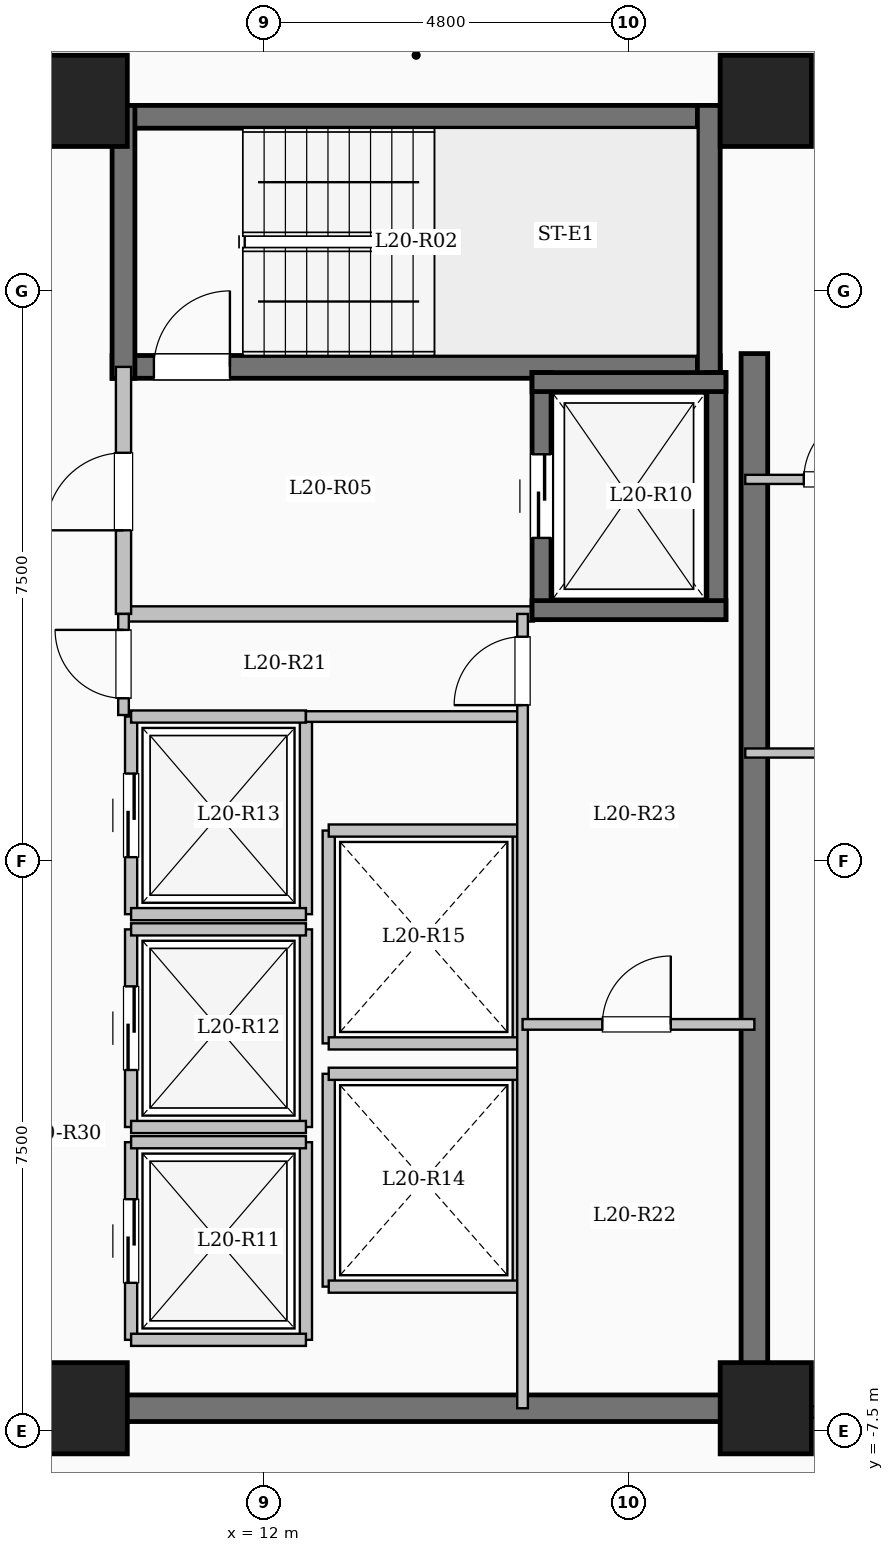
"""IFC4 building model, lengths in metres.
Left out: names, types, materials, properties, quantities, classifications, styles, units other than length and angle.
Written with IfcOpenShell. Run it as: python <this file> out.ifc"""

import sys

from ifc_helpers import new_model, si_unit, direction, frame, frame_2d, origin, origin_2d, place, context, subcontext, project, spatial, rectangle, extrude, element, fill, save


model = new_model("IFC4")
c1 = context("Model", 3, precision=1e-05, world=origin(), true_north=direction((0.0, 1.0)))
c2 = subcontext(c1, "Body", "Model", "MODEL_VIEW")
j1 = project(units=[si_unit("LENGTHUNIT", "METRE"), si_unit("PLANEANGLEUNIT", "RADIAN")], contexts=[c1])
p1 = place(None, origin())
s1 = spatial("IfcSite", under=j1, at=p1, CompositionType="ELEMENT")
p2 = place(p1, origin())
s2 = spatial("IfcBuilding", under=s1, at=p2, CompositionType="ELEMENT")
p3 = place(p2, frame((0.0, 0.0, 78.3)))
s3 = spatial("IfcBuildingStorey", under=s2, at=p3, CompositionType="ELEMENT", Elevation=78.3)
for number, where, z_axis, x_axis in (
    (1, (9.6, -7.2, 0.0), (0.0, 0.0, 1.0), (1.0, 0.0, 0.0)),
    (2, (9.6, 10.0, 0.0), (0.0, 0.0, 1.0), (1.0, 0.0, 0.0)),
    (3, (18.6, -7.2, 0.0), (0.0, 0.0, 1.0), (1.0, 0.0, 0.0)),
    (4, (18.6, 10.0, 0.0), (0.0, 0.0, 1.0), (1.0, 0.0, 0.0)),
):
    element("IfcColumn", number, at=place(p3, frame(where, z_axis=z_axis, x_axis=x_axis)), inside=s3, PredefinedType="COLUMN", context=c2, shape_type="SweptSolid", body=[
        extrude(rectangle(XDim=1.2, YDim=1.2, at=origin_2d()), origin(), (0.0, 0.0, 1.0), 3.35),
    ])
p4 = place(p3, frame((10.0, 9.79, 0.0), z_axis=(0.0, 0.0, 1.0), x_axis=(1.0, 0.0, 0.0)))
e5 = element("IfcWall", 5, at=p4, inside=s3, PredefinedType="SHEAR", context=c2, shape_type="SweptSolid", body=[
    extrude(rectangle(XDim=8.0, YDim=0.3, at=frame_2d((4.0, 0.0))), origin(), (0.0, 0.0, 1.0), 3.35),
])
p5 = place(p3, frame((10.0, 6.5, 0.0), z_axis=(0.0, 0.0, 1.0), x_axis=(1.0, 0.0, 0.0)))
e6 = element("IfcWall", 6, at=p5, inside=s3, PredefinedType="SHEAR", context=c2, shape_type="SweptSolid", body=[
    extrude(rectangle(XDim=8.0, YDim=0.3, at=frame_2d((4.0, 0.0))), origin(), (0.0, 0.0, 1.0), 3.35),
])
p6 = place(p5, frame((0.55, 0.0, 0.0)))
e7 = element("IfcOpeningElement", 7, at=p6, cuts=e6, PredefinedType="OPENING", context=c2, shape_type="SweptSolid", body=[
    extrude(rectangle(XDim=1.0, YDim=2.15, at=frame_2d((0.5, 1.075))), frame((0.0, 0.16, 0.0), z_axis=(0.0, -1.0, 0.0), x_axis=(1.0, 0.0, 0.0)), (0.0, 0.0, 1.0), 0.32),
])
for number, where, z_axis, x_axis in (
    (8, (10.15, 6.35, 0.0), (0.0, 0.0, 1.0), (0.0, 1.0, 0.0)),
    (9, (17.85, 6.35, 0.0), (0.0, 0.0, 1.0), (0.0, 1.0, 0.0)),
):
    element("IfcWall", number, at=place(p3, frame(where, z_axis=z_axis, x_axis=x_axis)), inside=s3, PredefinedType="SHEAR", context=c2, shape_type="SweptSolid", body=[
        extrude(rectangle(XDim=3.59, YDim=0.3, at=frame_2d((1.795, 0.0))), origin(), (0.0, 0.0, 1.0), 3.35),
    ])
p7 = place(p3, frame((10.15, 3.25, 0.0), z_axis=(0.0, 0.0, 1.0), x_axis=(1.0, 0.0, 0.0)))
e10 = element("IfcWall", 10, at=p7, inside=s3, PredefinedType="SOLIDWALL", context=c2, shape_type="SweptSolid", body=[
    extrude(rectangle(XDim=5.4, YDim=0.2, at=frame_2d((2.7, 0.0))), origin(), (0.0, 0.0, 1.0), 3.1),
])
p8 = place(p3, frame((10.15, 3.25, 0.0), z_axis=(0.0, 0.0, 1.0), x_axis=(0.0, 1.0, 0.0)))
e11 = element("IfcWall", 11, at=p8, inside=s3, PredefinedType="SOLIDWALL", context=c2, shape_type="SweptSolid", body=[
    extrude(rectangle(XDim=3.25, YDim=0.2, at=frame_2d((1.625, 0.0))), origin(), (0.0, 0.0, 1.0), 3.1),
])
p9 = place(p8, frame((1.1, 0.0, 0.0)))
e12 = element("IfcOpeningElement", 12, at=p9, cuts=e11, PredefinedType="OPENING", context=c2, shape_type="SweptSolid", body=[
    extrude(rectangle(XDim=1.02, YDim=2.15, at=frame_2d((0.51, 1.075))), frame((0.0, 0.11, 0.0), z_axis=(0.0, -1.0, 0.0), x_axis=(1.0, 0.0, 0.0)), (0.0, 0.0, 1.0), 0.22),
])
p10 = place(p3, frame((15.65, 3.175, 0.0), z_axis=(0.0, 0.0, 1.0), x_axis=(0.0, 1.0, 0.0)))
e13 = element("IfcWall", 13, at=p10, inside=s3, PredefinedType="SHEAR", context=c2, shape_type="SweptSolid", body=[
    extrude(rectangle(XDim=3.25, YDim=0.25, at=frame_2d((1.625, 0.0))), origin(), (0.0, 0.0, 1.0), 3.35),
])
p11 = place(p10, frame((1.075, 0.0, 0.0)))
e14 = element("IfcOpeningElement", 14, at=p11, cuts=e13, PredefinedType="OPENING", context=c2, shape_type="SweptSolid", body=[
    extrude(rectangle(XDim=1.1, YDim=2.15, at=frame_2d((0.55, 1.075))), frame((0.0, 0.135, 0.0), z_axis=(0.0, -1.0, 0.0), x_axis=(1.0, 0.0, 0.0)), (0.0, 0.0, 1.0), 0.27),
])
p12 = place(p3, frame((17.95, 3.175, 0.0), z_axis=(0.0, 0.0, 1.0), x_axis=(0.0, 1.0, 0.0)))
e15 = element("IfcWall", 15, at=p12, inside=s3, PredefinedType="SHEAR", context=c2, shape_type="SweptSolid", body=[
    extrude(rectangle(XDim=3.25, YDim=0.25, at=frame_2d((1.625, 0.0))), origin(), (0.0, 0.0, 1.0), 3.35),
])
for number, where, z_axis, x_axis in (
    (16, (15.525, 3.3, 0.0), (0.0, 0.0, 1.0), (1.0, 0.0, 0.0)),
    (17, (15.525, 6.3, 0.0), (0.0, 0.0, 1.0), (1.0, 0.0, 0.0)),
):
    element("IfcWall", number, at=place(p3, frame(where, z_axis=z_axis, x_axis=x_axis)), inside=s3, PredefinedType="SHEAR", context=c2, shape_type="SweptSolid", body=[
        extrude(rectangle(XDim=2.55, YDim=0.25, at=frame_2d((1.275, 0.0))), origin(), (0.0, 0.0, 1.0), 3.35),
    ])
p13 = place(p3, frame((10.25, -6.3, 0.0), z_axis=(0.0, 0.0, 1.0), x_axis=(0.0, 1.0, 0.0)))
e18 = element("IfcWall", 18, at=p13, inside=s3, PredefinedType="SOLIDWALL", context=c2, shape_type="SweptSolid", body=[
    extrude(rectangle(XDim=2.6, YDim=0.16, at=frame_2d((1.3, 0.0))), origin(), (0.0, 0.0, 1.0), 3.1),
])
p14 = place(p13, frame((0.75, 0.0, 0.0)))
e19 = element("IfcOpeningElement", 19, at=p14, cuts=e18, PredefinedType="OPENING", context=c2, shape_type="SweptSolid", body=[
    extrude(rectangle(XDim=1.1, YDim=2.15, at=frame_2d((0.55, 1.075))), frame((0.0, 0.09, 0.0), z_axis=(0.0, -1.0, 0.0), x_axis=(1.0, 0.0, 0.0)), (0.0, 0.0, 1.0), 0.18),
])
p15 = place(p3, frame((12.55, -6.3, 0.0), z_axis=(0.0, 0.0, 1.0), x_axis=(0.0, 1.0, 0.0)))
e20 = element("IfcWall", 20, at=p15, inside=s3, PredefinedType="SOLIDWALL", context=c2, shape_type="SweptSolid", body=[
    extrude(rectangle(XDim=2.6, YDim=0.16, at=frame_2d((1.3, 0.0))), origin(), (0.0, 0.0, 1.0), 3.1),
])
for number, where, z_axis, x_axis in (
    (21, (10.25, -6.3, 0.0), (0.0, 0.0, 1.0), (1.0, 0.0, 0.0)),
    (22, (10.25, -3.7, 0.0), (0.0, 0.0, 1.0), (1.0, 0.0, 0.0)),
):
    element("IfcWall", number, at=place(p3, frame(where, z_axis=z_axis, x_axis=x_axis)), inside=s3, PredefinedType="SOLIDWALL", context=c2, shape_type="SweptSolid", body=[
        extrude(rectangle(XDim=2.3, YDim=0.16, at=frame_2d((1.15, 0.0))), origin(), (0.0, 0.0, 1.0), 3.1),
    ])
p16 = place(p3, frame((10.25, -3.5, 0.0), z_axis=(0.0, 0.0, 1.0), x_axis=(0.0, 1.0, 0.0)))
e23 = element("IfcWall", 23, at=p16, inside=s3, PredefinedType="SOLIDWALL", context=c2, shape_type="SweptSolid", body=[
    extrude(rectangle(XDim=2.6, YDim=0.16, at=frame_2d((1.3, 0.0))), origin(), (0.0, 0.0, 1.0), 3.1),
])
p17 = place(p16, frame((0.75, 0.0, 0.0)))
e24 = element("IfcOpeningElement", 24, at=p17, cuts=e23, PredefinedType="OPENING", context=c2, shape_type="SweptSolid", body=[
    extrude(rectangle(XDim=1.1, YDim=2.15, at=frame_2d((0.55, 1.075))), frame((0.0, 0.09, 0.0), z_axis=(0.0, -1.0, 0.0), x_axis=(1.0, 0.0, 0.0)), (0.0, 0.0, 1.0), 0.18),
])
p18 = place(p3, frame((12.55, -3.5, 0.0), z_axis=(0.0, 0.0, 1.0), x_axis=(0.0, 1.0, 0.0)))
e25 = element("IfcWall", 25, at=p18, inside=s3, PredefinedType="SOLIDWALL", context=c2, shape_type="SweptSolid", body=[
    extrude(rectangle(XDim=2.6, YDim=0.16, at=frame_2d((1.3, 0.0))), origin(), (0.0, 0.0, 1.0), 3.1),
])
for number, where, z_axis, x_axis in (
    (26, (10.25, -3.5, 0.0), (0.0, 0.0, 1.0), (1.0, 0.0, 0.0)),
    (27, (10.25, -0.9, 0.0), (0.0, 0.0, 1.0), (1.0, 0.0, 0.0)),
):
    element("IfcWall", number, at=place(p3, frame(where, z_axis=z_axis, x_axis=x_axis)), inside=s3, PredefinedType="SOLIDWALL", context=c2, shape_type="SweptSolid", body=[
        extrude(rectangle(XDim=2.3, YDim=0.16, at=frame_2d((1.15, 0.0))), origin(), (0.0, 0.0, 1.0), 3.1),
    ])
p19 = place(p3, frame((10.25, -0.7, 0.0), z_axis=(0.0, 0.0, 1.0), x_axis=(0.0, 1.0, 0.0)))
e28 = element("IfcWall", 28, at=p19, inside=s3, PredefinedType="SOLIDWALL", context=c2, shape_type="SweptSolid", body=[
    extrude(rectangle(XDim=2.6, YDim=0.16, at=frame_2d((1.3, 0.0))), origin(), (0.0, 0.0, 1.0), 3.1),
])
p20 = place(p19, frame((0.75, 0.0, 0.0)))
e29 = element("IfcOpeningElement", 29, at=p20, cuts=e28, PredefinedType="OPENING", context=c2, shape_type="SweptSolid", body=[
    extrude(rectangle(XDim=1.1, YDim=2.15, at=frame_2d((0.55, 1.075))), frame((0.0, 0.09, 0.0), z_axis=(0.0, -1.0, 0.0), x_axis=(1.0, 0.0, 0.0)), (0.0, 0.0, 1.0), 0.18),
])
p21 = place(p3, frame((12.55, -0.7, 0.0), z_axis=(0.0, 0.0, 1.0), x_axis=(0.0, 1.0, 0.0)))
e30 = element("IfcWall", 30, at=p21, inside=s3, PredefinedType="SOLIDWALL", context=c2, shape_type="SweptSolid", body=[
    extrude(rectangle(XDim=2.6, YDim=0.16, at=frame_2d((1.3, 0.0))), origin(), (0.0, 0.0, 1.0), 3.1),
])
for number, where, z_axis, x_axis in (
    (31, (10.25, -0.7, 0.0), (0.0, 0.0, 1.0), (1.0, 0.0, 0.0)),
    (32, (10.25, 1.9, 0.0), (0.0, 0.0, 1.0), (1.0, 0.0, 0.0)),
):
    element("IfcWall", number, at=place(p3, frame(where, z_axis=z_axis, x_axis=x_axis)), inside=s3, PredefinedType="SOLIDWALL", context=c2, shape_type="SweptSolid", body=[
        extrude(rectangle(XDim=2.3, YDim=0.16, at=frame_2d((1.15, 0.0))), origin(), (0.0, 0.0, 1.0), 3.1),
    ])
for number, where, z_axis, x_axis in (
    (33, (12.85, -5.6, 0.0), (0.0, 0.0, 1.0), (0.0, 1.0, 0.0)),
    (34, (15.35, -5.6, 0.0), (0.0, 0.0, 1.0), (0.0, 1.0, 0.0)),
):
    element("IfcWall", number, at=place(p3, frame(where, z_axis=z_axis, x_axis=x_axis)), inside=s3, PredefinedType="SOLIDWALL", context=c2, shape_type="SweptSolid", body=[
        extrude(rectangle(XDim=2.8, YDim=0.16, at=frame_2d((1.4, 0.0))), origin(), (0.0, 0.0, 1.0), 3.1),
    ])
for number, where, z_axis, x_axis in (
    (35, (12.85, -5.6, 0.0), (0.0, 0.0, 1.0), (1.0, 0.0, 0.0)),
    (36, (12.85, -2.8, 0.0), (0.0, 0.0, 1.0), (1.0, 0.0, 0.0)),
):
    element("IfcWall", number, at=place(p3, frame(where, z_axis=z_axis, x_axis=x_axis)), inside=s3, PredefinedType="SOLIDWALL", context=c2, shape_type="SweptSolid", body=[
        extrude(rectangle(XDim=2.5, YDim=0.16, at=frame_2d((1.25, 0.0))), origin(), (0.0, 0.0, 1.0), 3.1),
    ])
for number, where, z_axis, x_axis in (
    (37, (12.85, -2.4, 0.0), (0.0, 0.0, 1.0), (0.0, 1.0, 0.0)),
    (38, (15.35, -2.4, 0.0), (0.0, 0.0, 1.0), (0.0, 1.0, 0.0)),
):
    element("IfcWall", number, at=place(p3, frame(where, z_axis=z_axis, x_axis=x_axis)), inside=s3, PredefinedType="SOLIDWALL", context=c2, shape_type="SweptSolid", body=[
        extrude(rectangle(XDim=2.8, YDim=0.16, at=frame_2d((1.4, 0.0))), origin(), (0.0, 0.0, 1.0), 3.1),
    ])
for number, where, z_axis, x_axis in (
    (39, (12.85, -2.4, 0.0), (0.0, 0.0, 1.0), (1.0, 0.0, 0.0)),
    (40, (12.85, 0.4, 0.0), (0.0, 0.0, 1.0), (1.0, 0.0, 0.0)),
):
    element("IfcWall", number, at=place(p3, frame(where, z_axis=z_axis, x_axis=x_axis)), inside=s3, PredefinedType="SOLIDWALL", context=c2, shape_type="SweptSolid", body=[
        extrude(rectangle(XDim=2.5, YDim=0.16, at=frame_2d((1.25, 0.0))), origin(), (0.0, 0.0, 1.0), 3.1),
    ])
p22 = place(p3, frame((18.45, -7.375, 0.0), z_axis=(0.0, 0.0, 1.0), x_axis=(0.0, 1.0, 0.0)))
e41 = element("IfcWall", 41, at=p22, inside=s3, PredefinedType="SHEAR", context=c2, shape_type="SweptSolid", body=[
    extrude(rectangle(XDim=14.05, YDim=0.35, at=frame_2d((7.025, 0.0))), origin(), (0.0, 0.0, 1.0), 3.35),
])
p23 = place(p3, frame((10.075, -7.2, 0.0), z_axis=(0.0, 0.0, 1.0), x_axis=(1.0, 0.0, 0.0)))
e42 = element("IfcWall", 42, at=p23, inside=s3, PredefinedType="SHEAR", context=c2, shape_type="SweptSolid", body=[
    extrude(rectangle(XDim=8.55, YDim=0.35, at=frame_2d((4.275, 0.0))), origin(), (0.0, 0.0, 1.0), 3.35),
])
p24 = place(p3, frame((12.55, 1.9, 0.0), z_axis=(0.0, 0.0, 1.0), x_axis=(1.0, 0.0, 0.0)))
e43 = element("IfcWall", 43, at=p24, inside=s3, PredefinedType="PARTITIONING", context=c2, shape_type="SweptSolid", body=[
    extrude(rectangle(XDim=2.85, YDim=0.14, at=frame_2d((1.425, 0.0))), origin(), (0.0, 0.0, 1.0), 3.1),
])
p25 = place(p3, frame((10.15, 1.92, 0.0), z_axis=(0.0, 0.0, 1.0), x_axis=(0.0, 1.0, 0.0)))
e44 = element("IfcWall", 44, at=p25, inside=s3, PredefinedType="PARTITIONING", context=c2, shape_type="SweptSolid", body=[
    extrude(rectangle(XDim=1.33, YDim=0.14, at=frame_2d((0.665, 0.0))), origin(), (0.0, 0.0, 1.0), 3.1),
])
p26 = place(p25, frame((0.22, 0.0, 0.0)))
e45 = element("IfcOpeningElement", 45, at=p26, cuts=e44, PredefinedType="OPENING", context=c2, shape_type="SweptSolid", body=[
    extrude(rectangle(XDim=0.9, YDim=2.08, at=frame_2d((0.45, 1.04))), frame((0.0, 0.08, 0.0), z_axis=(0.0, -1.0, 0.0), x_axis=(1.0, 0.0, 0.0)), (0.0, 0.0, 1.0), 0.16),
])
p27 = place(p3, frame((15.4, -7.2, 0.0), z_axis=(0.0, 0.0, 1.0), x_axis=(0.0, 1.0, 0.0)))
e46 = element("IfcWall", 46, at=p27, inside=s3, PredefinedType="PARTITIONING", context=c2, shape_type="SweptSolid", body=[
    extrude(rectangle(XDim=10.45, YDim=0.14, at=frame_2d((5.225, 0.0))), origin(), (0.0, 0.0, 1.0), 3.1),
])
p28 = place(p27, frame((9.25, 0.0, 0.0)))
e47 = element("IfcOpeningElement", 47, at=p28, cuts=e46, PredefinedType="OPENING", context=c2, shape_type="SweptSolid", body=[
    extrude(rectangle(XDim=0.9, YDim=2.08, at=frame_2d((0.45, 1.04))), frame((0.0, 0.08, 0.0), z_axis=(0.0, -1.0, 0.0), x_axis=(1.0, 0.0, 0.0)), (0.0, 0.0, 1.0), 0.16),
])
p29 = place(p3, frame((15.4, -2.15, 0.0), z_axis=(0.0, 0.0, 1.0), x_axis=(1.0, 0.0, 0.0)))
e48 = element("IfcWall", 48, at=p29, inside=s3, PredefinedType="PARTITIONING", context=c2, shape_type="SweptSolid", body=[
    extrude(rectangle(XDim=3.05, YDim=0.14, at=frame_2d((1.525, 0.0))), origin(), (0.0, 0.0, 1.0), 3.1),
])
p30 = place(p29, frame((1.05, 0.0, 0.0)))
e49 = element("IfcOpeningElement", 49, at=p30, cuts=e48, PredefinedType="OPENING", context=c2, shape_type="SweptSolid", body=[
    extrude(rectangle(XDim=0.9, YDim=2.08, at=frame_2d((0.45, 1.04))), frame((0.0, 0.08, 0.0), z_axis=(0.0, -1.0, 0.0), x_axis=(1.0, 0.0, 0.0)), (0.0, 0.0, 1.0), 0.16),
])
p31 = place(p3, frame((18.45, -7.25, 0.0), z_axis=(0.0, 0.0, 1.0), x_axis=(1.0, 0.0, 0.0)))
e50 = element("IfcWall", 50, at=p31, inside=s3, PredefinedType="PARTITIONING", context=c2, shape_type="SweptSolid", body=[
    extrude(rectangle(XDim=8.43, YDim=0.15, at=frame_2d((4.215, 0.0))), origin(), (0.0, 0.0, 1.0), 3.1),
])
p32 = place(p31, frame((1.95, 0.0, 0.0)))
e51 = element("IfcOpeningElement", 51, at=p32, cuts=e50, PredefinedType="OPENING", context=c2, shape_type="SweptSolid", body=[
    extrude(rectangle(XDim=0.96, YDim=2.15, at=frame_2d((0.48, 1.075))), frame((0.0, 0.085, 0.0), z_axis=(0.0, -1.0, 0.0), x_axis=(1.0, 0.0, 0.0)), (0.0, 0.0, 1.0), 0.17),
])
p33 = place(p3, frame((18.33, 1.42, 0.0), z_axis=(0.0, 0.0, 1.0), x_axis=(1.0, 0.0, 0.0)))
e52 = element("IfcWall", 52, at=p33, inside=s3, PredefinedType="PARTITIONING", context=c2, shape_type="SweptSolid", body=[
    extrude(rectangle(XDim=8.67, YDim=0.12, at=frame_2d((4.335, 0.0))), origin(), (0.0, 0.0, 1.0), 3.1),
])
p34 = place(p33, frame((1.863, 0.0, 0.0)))
e53 = element("IfcOpeningElement", 53, at=p34, cuts=e52, PredefinedType="OPENING", context=c2, shape_type="SweptSolid", body=[
    extrude(rectangle(XDim=0.88, YDim=2.1, at=frame_2d((0.44, 1.05))), frame((0.0, 0.07, 0.0), z_axis=(0.0, -1.0, 0.0), x_axis=(1.0, 0.0, 0.0)), (0.0, 0.0, 1.0), 0.14),
])
p35 = place(p33, frame((6.028, 0.0, 0.0)))
e54 = element("IfcOpeningElement", 54, at=p35, cuts=e52, PredefinedType="OPENING", context=c2, shape_type="SweptSolid", body=[
    extrude(rectangle(XDim=0.88, YDim=2.1, at=frame_2d((0.44, 1.05))), frame((0.0, 0.07, 0.0), z_axis=(0.0, -1.0, 0.0), x_axis=(1.0, 0.0, 0.0)), (0.0, 0.0, 1.0), 0.14),
])
p36 = place(p3, frame((18.33, 5.02, 0.0), z_axis=(0.0, 0.0, 1.0), x_axis=(1.0, 0.0, 0.0)))
e55 = element("IfcWall", 55, at=p36, inside=s3, PredefinedType="PARTITIONING", context=c2, shape_type="SweptSolid", body=[
    extrude(rectangle(XDim=8.67, YDim=0.12, at=frame_2d((4.335, 0.0))), origin(), (0.0, 0.0, 1.0), 3.1),
])
p37 = place(p36, frame((0.77, 0.0, 0.0)))
e56 = element("IfcOpeningElement", 56, at=p37, cuts=e55, PredefinedType="OPENING", context=c2, shape_type="SweptSolid", body=[
    extrude(rectangle(XDim=0.88, YDim=2.1, at=frame_2d((0.44, 1.05))), frame((0.0, 0.07, 0.0), z_axis=(0.0, -1.0, 0.0), x_axis=(1.0, 0.0, 0.0)), (0.0, 0.0, 1.0), 0.14),
])
p38 = place(p6, origin())
e57 = element("IfcDoor", 57, at=p38, inside=s3, OperationType="SINGLE_SWING_RIGHT", PredefinedType="DOOR", context=c2, shape_type="SweptSolid", body=[
    extrude(rectangle(XDim=1.0, YDim=2.15, at=frame_2d((0.5, 1.075))), frame((0.0, 0.025, 0.0), z_axis=(0.0, -1.0, 0.0), x_axis=(1.0, 0.0, 0.0)), (0.0, 0.0, 1.0), 0.05),
])
fill(e7, e57)
p39 = place(p9, origin())
e58 = element("IfcDoor", 58, at=p39, inside=s3, OperationType="SINGLE_SWING_LEFT", PredefinedType="DOOR", context=c2, shape_type="SweptSolid", body=[
    extrude(rectangle(XDim=1.02, YDim=2.15, at=frame_2d((0.51, 1.075))), frame((0.0, 0.025, 0.0), z_axis=(0.0, -1.0, 0.0), x_axis=(1.0, 0.0, 0.0)), (0.0, 0.0, 1.0), 0.05),
])
fill(e12, e58)
p40 = place(p11, origin())
e59 = element("IfcDoor", 59, at=p40, inside=s3, OperationType="SLIDING_TO_LEFT", PredefinedType="DOOR", context=c2, shape_type="SweptSolid", body=[
    extrude(rectangle(XDim=1.1, YDim=2.15, at=frame_2d((0.55, 1.075))), frame((0.0, 0.025, 0.0), z_axis=(0.0, -1.0, 0.0), x_axis=(1.0, 0.0, 0.0)), (0.0, 0.0, 1.0), 0.05),
])
fill(e14, e59)
p41 = place(p14, origin())
e60 = element("IfcDoor", 60, at=p41, inside=s3, OperationType="SLIDING_TO_LEFT", PredefinedType="DOOR", context=c2, shape_type="SweptSolid", body=[
    extrude(rectangle(XDim=1.1, YDim=2.15, at=frame_2d((0.55, 1.075))), frame((0.0, 0.025, 0.0), z_axis=(0.0, -1.0, 0.0), x_axis=(1.0, 0.0, 0.0)), (0.0, 0.0, 1.0), 0.05),
])
fill(e19, e60)
p42 = place(p17, origin())
e61 = element("IfcDoor", 61, at=p42, inside=s3, OperationType="SLIDING_TO_LEFT", PredefinedType="DOOR", context=c2, shape_type="SweptSolid", body=[
    extrude(rectangle(XDim=1.1, YDim=2.15, at=frame_2d((0.55, 1.075))), frame((0.0, 0.025, 0.0), z_axis=(0.0, -1.0, 0.0), x_axis=(1.0, 0.0, 0.0)), (0.0, 0.0, 1.0), 0.05),
])
fill(e24, e61)
p43 = place(p20, origin())
e62 = element("IfcDoor", 62, at=p43, inside=s3, OperationType="SLIDING_TO_LEFT", PredefinedType="DOOR", context=c2, shape_type="SweptSolid", body=[
    extrude(rectangle(XDim=1.1, YDim=2.15, at=frame_2d((0.55, 1.075))), frame((0.0, 0.025, 0.0), z_axis=(0.0, -1.0, 0.0), x_axis=(1.0, 0.0, 0.0)), (0.0, 0.0, 1.0), 0.05),
])
fill(e29, e62)
p44 = place(p26, origin())
e63 = element("IfcDoor", 63, at=p44, inside=s3, OperationType="SINGLE_SWING_RIGHT", PredefinedType="DOOR", context=c2, shape_type="SweptSolid", body=[
    extrude(rectangle(XDim=0.9, YDim=2.08, at=frame_2d((0.45, 1.04))), frame((0.0, 0.025, 0.0), z_axis=(0.0, -1.0, 0.0), x_axis=(1.0, 0.0, 0.0)), (0.0, 0.0, 1.0), 0.05),
])
fill(e45, e63)
p45 = place(p28, origin())
e64 = element("IfcDoor", 64, at=p45, inside=s3, OperationType="SINGLE_SWING_LEFT", PredefinedType="DOOR", context=c2, shape_type="SweptSolid", body=[
    extrude(rectangle(XDim=0.9, YDim=2.08, at=frame_2d((0.45, 1.04))), frame((0.0, 0.025, 0.0), z_axis=(0.0, -1.0, 0.0), x_axis=(1.0, 0.0, 0.0)), (0.0, 0.0, 1.0), 0.05),
])
fill(e47, e64)
p46 = place(p30, origin())
e65 = element("IfcDoor", 65, at=p46, inside=s3, OperationType="SINGLE_SWING_RIGHT", PredefinedType="DOOR", context=c2, shape_type="SweptSolid", body=[
    extrude(rectangle(XDim=0.9, YDim=2.08, at=frame_2d((0.45, 1.04))), frame((0.0, 0.025, 0.0), z_axis=(0.0, -1.0, 0.0), x_axis=(1.0, 0.0, 0.0)), (0.0, 0.0, 1.0), 0.05),
])
fill(e49, e65)
p47 = place(p37, origin())
e66 = element("IfcDoor", 66, at=p47, inside=s3, OperationType="SINGLE_SWING_RIGHT", PredefinedType="DOOR", context=c2, shape_type="SweptSolid", body=[
    extrude(rectangle(XDim=0.88, YDim=2.1, at=frame_2d((0.44, 1.05))), frame((0.0, 0.025, 0.0), z_axis=(0.0, -1.0, 0.0), x_axis=(1.0, 0.0, 0.0)), (0.0, 0.0, 1.0), 0.05),
])
fill(e56, e66)
save(model, sys.argv[1])
